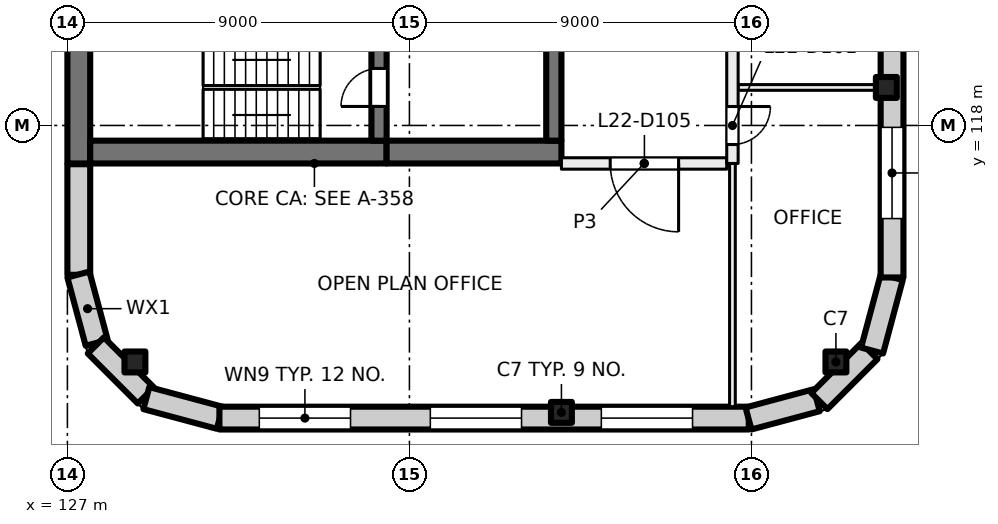
"""IFC4 building model, lengths in metres.
Left out: names, types, materials, properties, quantities, classifications, styles, units other than length and angle.
Written with IfcOpenShell. Run it as: python <this file> out.ifc"""

import sys

from ifc_helpers import new_model, si_unit, direction, frame, frame_2d, origin, origin_2d, place, context, subcontext, project, spatial, rectangle, extrude, element, fill, save


model = new_model("IFC4")
c1 = context("Model", 3, precision=1e-05, world=origin(), true_north=direction((0.0, 1.0)))
c2 = subcontext(c1, "Body", "Model", "MODEL_VIEW")
j1 = project(units=[si_unit("LENGTHUNIT", "METRE"), si_unit("PLANEANGLEUNIT", "RADIAN")], contexts=[c1])
p1 = place(None, origin())
s1 = spatial("IfcSite", under=j1, at=p1, CompositionType="ELEMENT")
p2 = place(p1, origin())
s2 = spatial("IfcBuilding", under=s1, at=p2, CompositionType="ELEMENT")
p3 = place(p2, frame((0.0, 0.0, 97.0)))
s3 = spatial("IfcBuildingStorey", under=s2, at=p3, CompositionType="ELEMENT", Elevation=97.0)
for number, where, z_axis, x_axis in (
    (1, (128.777, 111.777, 0.0), (0.0, 0.0, 1.0), (1.0, 0.0, 0.0)),
    (2, (148.55, 119.0, 0.0), (0.0, 0.0, 1.0), (1.0, 0.0, 0.0)),
    (3, (140.0, 110.45, 0.0), (0.0, 0.0, 1.0), (1.0, 0.0, 0.0)),
    (4, (147.223, 111.777, 0.0), (0.0, 0.0, 1.0), (1.0, 0.0, 0.0)),
):
    element("IfcColumn", number, at=place(p3, frame(where, z_axis=z_axis, x_axis=x_axis)), inside=s3, PredefinedType="COLUMN", context=c2, shape_type="SweptSolid", body=[
        extrude(rectangle(XDim=0.55, YDim=0.55, at=origin_2d()), origin(), (0.0, 0.0, 1.0), 4.0),
    ])
p4 = place(p3, frame((127.3, 117.0, 0.0), z_axis=(0.0, 0.0, 1.0), x_axis=(0.0, 1.0, 0.0)))
e5 = element("IfcWall", 5, at=p4, inside=s3, PredefinedType="SHEAR", context=c2, shape_type="SweptSolid", body=[
    extrude(rectangle(XDim=3.8, YDim=0.6, at=frame_2d((1.9, 0.0))), origin(), (0.0, 0.0, 1.0), 4.0),
])
p5 = place(p3, frame((127.6, 117.3, 0.0), z_axis=(0.0, 0.0, 1.0), x_axis=(1.0, 0.0, 0.0)))
e6 = element("IfcWall", 6, at=p5, inside=s3, PredefinedType="SHEAR", context=c2, shape_type="SweptSolid", body=[
    extrude(rectangle(XDim=7.8, YDim=0.6, at=frame_2d((3.9, 0.0))), origin(), (0.0, 0.0, 1.0), 4.0),
])
p6 = place(p3, frame((135.4, 117.3, 0.0), z_axis=(0.0, 0.0, 1.0), x_axis=(1.0, 0.0, 0.0)))
e7 = element("IfcWall", 7, at=p6, inside=s3, PredefinedType="SHEAR", context=c2, shape_type="SweptSolid", body=[
    extrude(rectangle(XDim=4.6, YDim=0.6, at=frame_2d((2.3, 0.0))), origin(), (0.0, 0.0, 1.0), 4.0),
])
p7 = place(p3, frame((135.2, 117.6, 0.0), z_axis=(0.0, 0.0, 1.0), x_axis=(0.0, 1.0, 0.0)))
e8 = element("IfcWall", 8, at=p7, inside=s3, PredefinedType="SHEAR", context=c2, shape_type="SweptSolid", body=[
    extrude(rectangle(XDim=2.8, YDim=0.4, at=frame_2d((1.4, 0.0))), origin(), (0.0, 0.0, 1.0), 4.0),
])
p8 = place(p7, frame((0.9, 0.0, 0.0)))
e9 = element("IfcOpeningElement", 9, at=p8, cuts=e8, PredefinedType="OPENING", context=c2, shape_type="SweptSolid", body=[
    extrude(rectangle(XDim=1.0, YDim=2.1, at=frame_2d((0.5, 1.05))), frame((0.0, 0.21, 0.0), z_axis=(0.0, -1.0, 0.0), x_axis=(1.0, 0.0, 0.0)), (0.0, 0.0, 1.0), 0.42),
])
p9 = place(p3, frame((139.8, 117.6, 0.0), z_axis=(0.0, 0.0, 1.0), x_axis=(0.0, 1.0, 0.0)))
e10 = element("IfcWall", 10, at=p9, inside=s3, PredefinedType="SHEAR", context=c2, shape_type="SweptSolid", body=[
    extrude(rectangle(XDim=8.6, YDim=0.4, at=frame_2d((4.3, 0.0))), origin(), (0.0, 0.0, 1.0), 4.0),
])
p10 = place(p3, frame((127.3, 114.07, 0.0), z_axis=(0.0, 0.0, 1.0), x_axis=(0.0, 1.0, 0.0)))
e11 = element("IfcWall", 11, at=p10, inside=s3, PredefinedType="SOLIDWALL", context=c2, shape_type="SweptSolid", body=[
    extrude(rectangle(XDim=2.91, YDim=0.6, at=frame_2d((1.455, 0.0))), origin(), (0.0, 0.0, 1.0), 3.625),
])
for number, where, z_axis, x_axis in (
    (12, (127.771, 112.281, 0.0), (0.0, 0.0, 1.0), (-0.259, 0.966, 0.0)),
    (13, (129.064, 110.896, 0.0), (0.0, 0.0, 1.0), (-0.707, 0.707, 0.0)),
):
    element("IfcWall", number, at=place(p3, frame(where, z_axis=z_axis, x_axis=x_axis)), inside=s3, PredefinedType="SOLIDWALL", context=c2, shape_type="SweptSolid", body=[
        extrude(rectangle(XDim=1.861, YDim=0.6, at=frame_2d((0.93, 0.0))), origin(), (0.0, 0.0, 1.0), 3.625),
    ])
p11 = place(p3, frame((131.01, 110.308, 0.0), z_axis=(0.0, 0.0, 1.0), x_axis=(-0.965920269068, 0.258839784042, 0.0)))
e14 = element("IfcWall", 14, at=p11, inside=s3, PredefinedType="SOLIDWALL", context=c2, shape_type="SweptSolid", body=[
    extrude(rectangle(XDim=2.0, YDim=0.6, at=frame_2d((1.0, 0.0))), origin(), (0.0, 0.0, 1.0), 3.625),
])
p12 = place(p3, frame((144.93, 110.3, 0.0), z_axis=(0.0, 0.0, 1.0), x_axis=(-1.0, 0.0, 0.0)))
e15 = element("IfcWall", 15, at=p12, inside=s3, PredefinedType="SOLIDWALL", context=c2, shape_type="SweptSolid", body=[
    extrude(rectangle(XDim=13.93, YDim=0.6, at=frame_2d((6.965, 0.0))), origin(), (0.0, 0.0, 1.0), 3.625),
])
p13 = place(p12, frame((1.48, 0.0, 0.9)))
e16 = element("IfcOpeningElement", 16, at=p13, cuts=e15, PredefinedType="OPENING", context=c2, shape_type="SweptSolid", body=[
    extrude(rectangle(XDim=2.4, YDim=2.4, at=frame_2d((1.2, 1.2))), frame((0.0, 0.31, 0.0), z_axis=(0.0, -1.0, 0.0), x_axis=(1.0, 0.0, 0.0)), (0.0, 0.0, 1.0), 0.62),
])
p14 = place(p12, frame((5.98, 0.0, 0.9)))
e17 = element("IfcOpeningElement", 17, at=p14, cuts=e15, PredefinedType="OPENING", context=c2, shape_type="SweptSolid", body=[
    extrude(rectangle(XDim=2.4, YDim=2.4, at=frame_2d((1.2, 1.2))), frame((0.0, 0.31, 0.0), z_axis=(0.0, -1.0, 0.0), x_axis=(1.0, 0.0, 0.0)), (0.0, 0.0, 1.0), 0.62),
])
p15 = place(p12, frame((10.48, 0.0, 0.9)))
e18 = element("IfcOpeningElement", 18, at=p15, cuts=e15, PredefinedType="OPENING", context=c2, shape_type="SweptSolid", body=[
    extrude(rectangle(XDim=2.4, YDim=2.4, at=frame_2d((1.2, 1.2))), frame((0.0, 0.31, 0.0), z_axis=(0.0, -1.0, 0.0), x_axis=(1.0, 0.0, 0.0)), (0.0, 0.0, 1.0), 0.62),
])
for number, where, z_axis, x_axis in (
    (19, (146.719, 110.771, 0.0), (0.0, 0.0, 1.0), (-0.966, -0.259, 0.0)),
    (20, (148.104, 112.064, 0.0), (0.0, 0.0, 1.0), (-0.707, -0.707, 0.0)),
):
    element("IfcWall", number, at=place(p3, frame(where, z_axis=z_axis, x_axis=x_axis)), inside=s3, PredefinedType="SOLIDWALL", context=c2, shape_type="SweptSolid", body=[
        extrude(rectangle(XDim=1.861, YDim=0.6, at=frame_2d((0.93, 0.0))), origin(), (0.0, 0.0, 1.0), 3.625),
    ])
p16 = place(p3, frame((148.692, 114.01, 0.0), z_axis=(0.0, 0.0, 1.0), x_axis=(-0.258839784042, -0.965920269068, 0.0)))
e21 = element("IfcWall", 21, at=p16, inside=s3, PredefinedType="SOLIDWALL", context=c2, shape_type="SweptSolid", body=[
    extrude(rectangle(XDim=2.0, YDim=0.6, at=frame_2d((1.0, 0.0))), origin(), (0.0, 0.0, 1.0), 3.625),
])
p17 = place(p3, frame((148.7, 141.93, 0.0), z_axis=(0.0, 0.0, 1.0), x_axis=(0.0, -1.0, 0.0)))
e22 = element("IfcWall", 22, at=p17, inside=s3, PredefinedType="SOLIDWALL", context=c2, shape_type="SweptSolid", body=[
    extrude(rectangle(XDim=27.93, YDim=0.6, at=frame_2d((13.965, 0.0))), origin(), (0.0, 0.0, 1.0), 3.625),
])
p18 = place(p17, frame((1.48, 0.0, 0.9)))
e23 = element("IfcOpeningElement", 23, at=p18, cuts=e22, PredefinedType="OPENING", context=c2, shape_type="SweptSolid", body=[
    extrude(rectangle(XDim=2.4, YDim=2.4, at=frame_2d((1.2, 1.2))), frame((0.0, 0.31, 0.0), z_axis=(0.0, -1.0, 0.0), x_axis=(1.0, 0.0, 0.0)), (0.0, 0.0, 1.0), 0.62),
])
p19 = place(p17, frame((5.98, 0.0, 0.9)))
e24 = element("IfcOpeningElement", 24, at=p19, cuts=e22, PredefinedType="OPENING", context=c2, shape_type="SweptSolid", body=[
    extrude(rectangle(XDim=2.4, YDim=2.4, at=frame_2d((1.2, 1.2))), frame((0.0, 0.31, 0.0), z_axis=(0.0, -1.0, 0.0), x_axis=(1.0, 0.0, 0.0)), (0.0, 0.0, 1.0), 0.62),
])
p20 = place(p17, frame((10.48, 0.0, 0.9)))
e25 = element("IfcOpeningElement", 25, at=p20, cuts=e22, PredefinedType="OPENING", context=c2, shape_type="SweptSolid", body=[
    extrude(rectangle(XDim=2.4, YDim=2.4, at=frame_2d((1.2, 1.2))), frame((0.0, 0.31, 0.0), z_axis=(0.0, -1.0, 0.0), x_axis=(1.0, 0.0, 0.0)), (0.0, 0.0, 1.0), 0.62),
])
p21 = place(p17, frame((14.98, 0.0, 0.9)))
e26 = element("IfcOpeningElement", 26, at=p21, cuts=e22, PredefinedType="OPENING", context=c2, shape_type="SweptSolid", body=[
    extrude(rectangle(XDim=2.4, YDim=2.4, at=frame_2d((1.2, 1.2))), frame((0.0, 0.31, 0.0), z_axis=(0.0, -1.0, 0.0), x_axis=(1.0, 0.0, 0.0)), (0.0, 0.0, 1.0), 0.62),
])
p22 = place(p17, frame((19.48, 0.0, 0.9)))
e27 = element("IfcOpeningElement", 27, at=p22, cuts=e22, PredefinedType="OPENING", context=c2, shape_type="SweptSolid", body=[
    extrude(rectangle(XDim=2.4, YDim=2.4, at=frame_2d((1.2, 1.2))), frame((0.0, 0.31, 0.0), z_axis=(0.0, -1.0, 0.0), x_axis=(1.0, 0.0, 0.0)), (0.0, 0.0, 1.0), 0.62),
])
p23 = place(p17, frame((23.98, 0.0, 0.9)))
e28 = element("IfcOpeningElement", 28, at=p23, cuts=e22, PredefinedType="OPENING", context=c2, shape_type="SweptSolid", body=[
    extrude(rectangle(XDim=2.4, YDim=2.4, at=frame_2d((1.2, 1.2))), frame((0.0, 0.31, 0.0), z_axis=(0.0, -1.0, 0.0), x_axis=(1.0, 0.0, 0.0)), (0.0, 0.0, 1.0), 0.62),
])
p24 = place(p3, frame((144.35, 117.0, 0.0), z_axis=(0.0, 0.0, 1.0), x_axis=(-1.0, 0.0, 0.0)))
e29 = element("IfcWall", 29, at=p24, inside=s3, PredefinedType="PARTITIONING", context=c2, shape_type="SweptSolid", body=[
    extrude(rectangle(XDim=4.35, YDim=0.3, at=frame_2d((2.175, 0.0))), origin(), (0.0, 0.0, 1.0), 3.625),
])
p25 = place(p24, frame((1.267, 0.0, 0.0)))
e30 = element("IfcOpeningElement", 30, at=p25, cuts=e29, PredefinedType="OPENING", context=c2, shape_type="SweptSolid", body=[
    extrude(rectangle(XDim=1.8, YDim=2.1, at=frame_2d((0.9, 1.05))), frame((0.0, 0.16, 0.0), z_axis=(0.0, -1.0, 0.0), x_axis=(1.0, 0.0, 0.0)), (0.0, 0.0, 1.0), 0.32),
])
p26 = place(p3, frame((144.5, 117.0, 0.0), z_axis=(0.0, 0.0, 1.0), x_axis=(0.0, -1.0, 0.0)))
e31 = element("IfcWall", 31, at=p26, inside=s3, PredefinedType="PARTITIONING", context=c2, shape_type="SweptSolid", body=[
    extrude(rectangle(XDim=6.4, YDim=0.15, at=frame_2d((3.2, 0.0))), origin(), (0.0, 0.0, 1.0), 3.625),
])
p27 = place(p3, frame((144.65, 119.0, 0.0), z_axis=(0.0, 0.0, 1.0), x_axis=(1.0, 0.0, 0.0)))
e32 = element("IfcWall", 32, at=p27, inside=s3, PredefinedType="PARTITIONING", context=c2, shape_type="SweptSolid", body=[
    extrude(rectangle(XDim=3.75, YDim=0.15, at=frame_2d((1.875, 0.0))), origin(), (0.0, 0.0, 1.0), 3.625),
])
p28 = place(p3, frame((144.5, 139.0, 0.0), z_axis=(0.0, 0.0, 1.0), x_axis=(0.0, -1.0, 0.0)))
e33 = element("IfcWall", 33, at=p28, inside=s3, PredefinedType="PARTITIONING", context=c2, shape_type="SweptSolid", body=[
    extrude(rectangle(XDim=22.0, YDim=0.3, at=frame_2d((11.0, 0.0))), origin(), (0.0, 0.0, 1.0), 3.625),
])
p29 = place(p28, frame((20.501, 0.0, 0.0)))
e34 = element("IfcOpeningElement", 34, at=p29, cuts=e33, PredefinedType="OPENING", context=c2, shape_type="SweptSolid", body=[
    extrude(rectangle(XDim=1.0, YDim=2.1, at=frame_2d((0.5, 1.05))), frame((0.0, 0.16, 0.0), z_axis=(0.0, -1.0, 0.0), x_axis=(1.0, 0.0, 0.0)), (0.0, 0.0, 1.0), 0.32),
])
p30 = place(p28, frame((15.0, 0.0, 0.0)))
e35 = element("IfcOpeningElement", 35, at=p30, cuts=e33, PredefinedType="OPENING", context=c2, shape_type="SweptSolid", body=[
    extrude(rectangle(XDim=1.0, YDim=2.1, at=frame_2d((0.5, 1.05))), frame((0.0, 0.16, 0.0), z_axis=(0.0, -1.0, 0.0), x_axis=(1.0, 0.0, 0.0)), (0.0, 0.0, 1.0), 0.32),
])
p31 = place(p28, frame((6.0, 0.0, 0.0)))
e36 = element("IfcOpeningElement", 36, at=p31, cuts=e33, PredefinedType="OPENING", context=c2, shape_type="SweptSolid", body=[
    extrude(rectangle(XDim=1.0, YDim=2.1, at=frame_2d((0.5, 1.05))), frame((0.0, 0.16, 0.0), z_axis=(0.0, -1.0, 0.0), x_axis=(1.0, 0.0, 0.0)), (0.0, 0.0, 1.0), 0.32),
])
p32 = place(p28, frame((0.499, 0.0, 0.0)))
e37 = element("IfcOpeningElement", 37, at=p32, cuts=e33, PredefinedType="OPENING", context=c2, shape_type="SweptSolid", body=[
    extrude(rectangle(XDim=1.0, YDim=2.1, at=frame_2d((0.5, 1.05))), frame((0.0, 0.16, 0.0), z_axis=(0.0, -1.0, 0.0), x_axis=(1.0, 0.0, 0.0)), (0.0, 0.0, 1.0), 0.32),
])
p33 = place(p13, origin())
e38 = element("IfcWindow", 38, at=p33, inside=s3, PartitioningType="SINGLE_PANEL", PredefinedType="WINDOW", context=c2, shape_type="SweptSolid", body=[
    extrude(rectangle(XDim=2.4, YDim=2.4, at=frame_2d((1.2, 1.2))), frame((0.0, 0.03, 0.0), z_axis=(0.0, -1.0, 0.0), x_axis=(1.0, 0.0, 0.0)), (0.0, 0.0, 1.0), 0.06),
])
fill(e16, e38)
p34 = place(p14, origin())
e39 = element("IfcWindow", 39, at=p34, inside=s3, PartitioningType="SINGLE_PANEL", PredefinedType="WINDOW", context=c2, shape_type="SweptSolid", body=[
    extrude(rectangle(XDim=2.4, YDim=2.4, at=frame_2d((1.2, 1.2))), frame((0.0, 0.03, 0.0), z_axis=(0.0, -1.0, 0.0), x_axis=(1.0, 0.0, 0.0)), (0.0, 0.0, 1.0), 0.06),
])
fill(e17, e39)
p35 = place(p15, origin())
e40 = element("IfcWindow", 40, at=p35, inside=s3, PartitioningType="SINGLE_PANEL", PredefinedType="WINDOW", context=c2, shape_type="SweptSolid", body=[
    extrude(rectangle(XDim=2.4, YDim=2.4, at=frame_2d((1.2, 1.2))), frame((0.0, 0.03, 0.0), z_axis=(0.0, -1.0, 0.0), x_axis=(1.0, 0.0, 0.0)), (0.0, 0.0, 1.0), 0.06),
])
fill(e18, e40)
p36 = place(p23, origin())
e41 = element("IfcWindow", 41, at=p36, inside=s3, PartitioningType="SINGLE_PANEL", PredefinedType="WINDOW", context=c2, shape_type="SweptSolid", body=[
    extrude(rectangle(XDim=2.4, YDim=2.4, at=frame_2d((1.2, 1.2))), frame((0.0, 0.03, 0.0), z_axis=(0.0, -1.0, 0.0), x_axis=(1.0, 0.0, 0.0)), (0.0, 0.0, 1.0), 0.06),
])
fill(e28, e41)
p37 = place(p8, origin())
e42 = element("IfcDoor", 42, at=p37, inside=s3, OperationType="SINGLE_SWING_RIGHT", PredefinedType="DOOR", context=c2, shape_type="SweptSolid", body=[
    extrude(rectangle(XDim=1.0, YDim=2.1, at=frame_2d((0.5, 1.05))), frame((0.0, 0.025, 0.0), z_axis=(0.0, -1.0, 0.0), x_axis=(1.0, 0.0, 0.0)), (0.0, 0.0, 1.0), 0.05),
])
fill(e9, e42)
p38 = place(p29, origin())
e43 = element("IfcDoor", 43, at=p38, inside=s3, OperationType="SINGLE_SWING_LEFT", PredefinedType="DOOR", context=c2, shape_type="SweptSolid", body=[
    extrude(rectangle(XDim=1.0, YDim=2.1, at=frame_2d((0.5, 1.05))), frame((0.0, 0.025, 0.0), z_axis=(0.0, -1.0, 0.0), x_axis=(1.0, 0.0, 0.0)), (0.0, 0.0, 1.0), 0.05),
])
fill(e34, e43)
p39 = place(p25, origin())
e44 = element("IfcDoor", 44, at=p39, inside=s3, OperationType="DOUBLE_DOOR_SINGLE_SWING", PredefinedType="DOOR", context=c2, shape_type="SweptSolid", body=[
    extrude(rectangle(XDim=1.8, YDim=2.1, at=frame_2d((0.9, 1.05))), frame((0.0, 0.025, 0.0), z_axis=(0.0, -1.0, 0.0), x_axis=(1.0, 0.0, 0.0)), (0.0, 0.0, 1.0), 0.05),
])
fill(e30, e44)
save(model, sys.argv[1])
